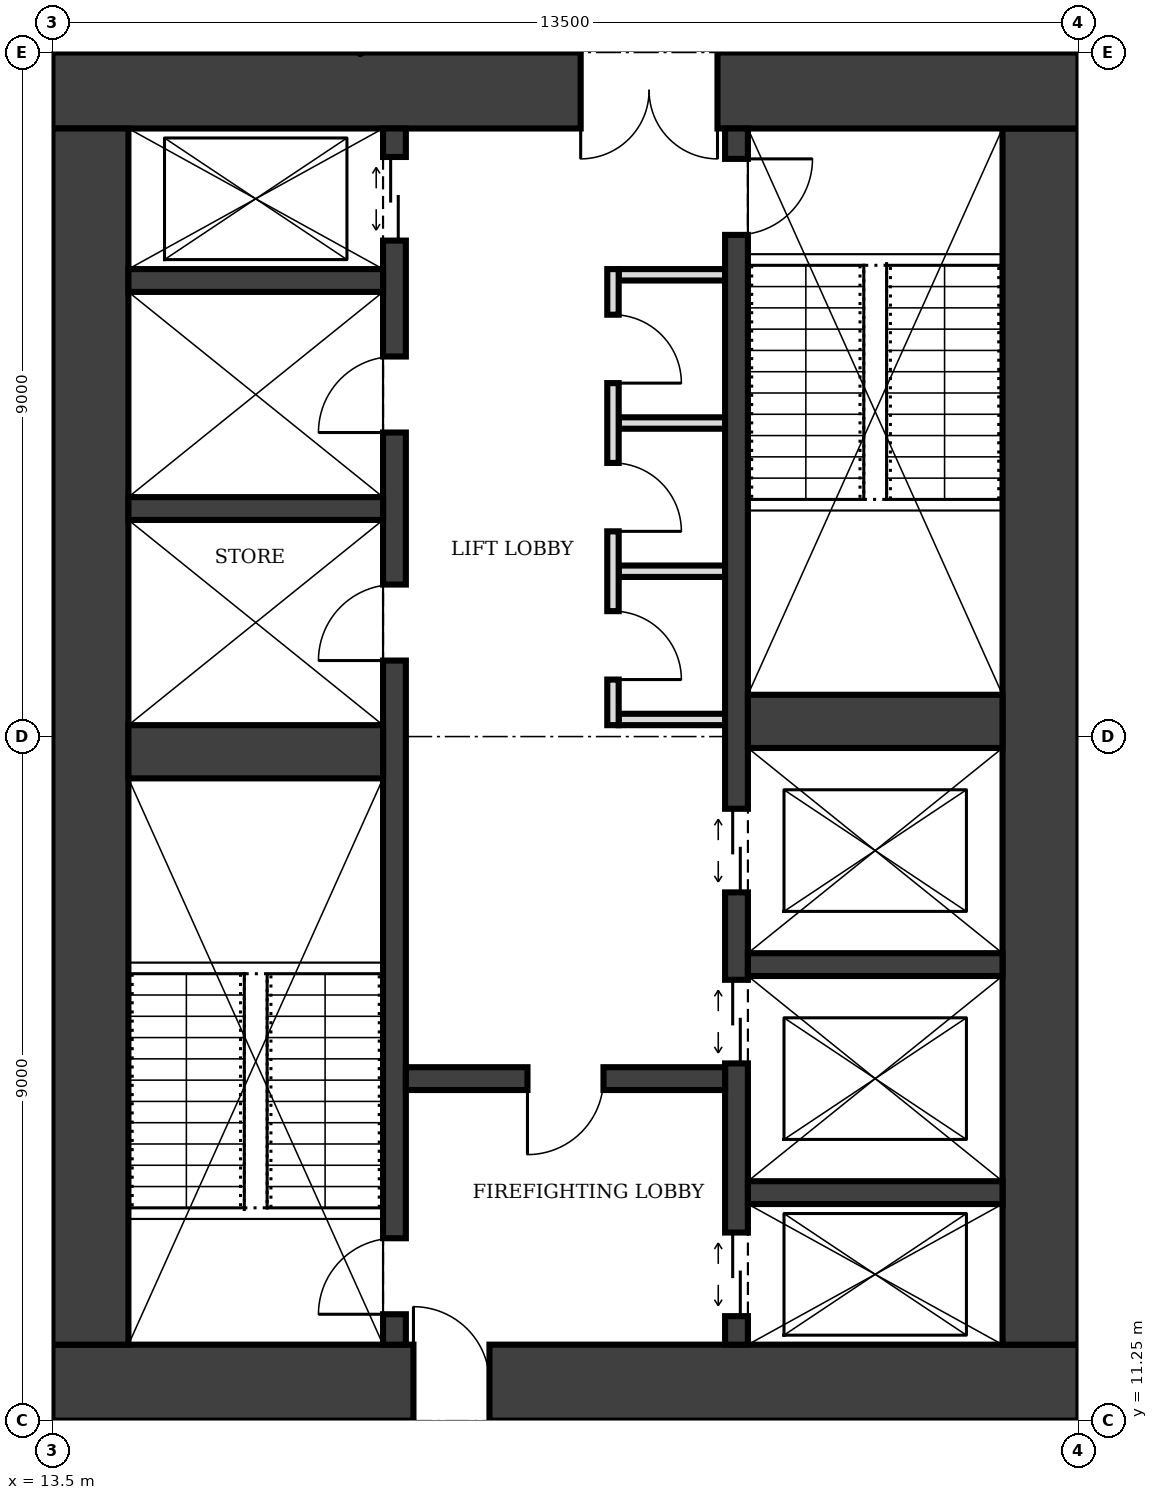
"""IFC4 building model, lengths in metres.
Left out: names, types, materials, properties, quantities, classifications, styles, units other than length and angle.
Written with IfcOpenShell. Run it as: python <this file> out.ifc"""

import sys

from ifc_helpers import new_model, si_unit, direction, frame, frame_2d, origin, place, context, subcontext, project, spatial, rectangle, extrude, element, fill, save


model = new_model("IFC4")
c1 = context("Model", 3, precision=1e-05, world=origin(), true_north=direction((0.0, 1.0)))
c2 = subcontext(c1, "Body", "Model", "MODEL_VIEW")
j1 = project(units=[si_unit("LENGTHUNIT", "METRE"), si_unit("PLANEANGLEUNIT", "RADIAN")], contexts=[c1])
p1 = place(None, origin())
s1 = spatial("IfcSite", under=j1, at=p1, CompositionType="ELEMENT")
p2 = place(p1, origin())
s2 = spatial("IfcBuilding", under=s1, at=p2, CompositionType="ELEMENT")
p3 = place(p2, frame((0.0, 0.0, 137.0)))
s3 = spatial("IfcBuildingStorey", under=s2, at=p3, CompositionType="ELEMENT", Elevation=137.0)
p4 = place(p3, frame((13.5, 11.75, 0.0), z_axis=(0.0, 0.0, 1.0), x_axis=(1.0, 0.0, 0.0)))
e1 = element("IfcWall", 1, at=p4, inside=s3, PredefinedType="SHEAR", context=c2, shape_type="SweptSolid", body=[
    extrude(rectangle(XDim=13.5, YDim=1.0, at=frame_2d((6.75, 0.0))), origin(), (0.0, 0.0, 1.0), 4.0),
])
p5 = place(p4, frame((4.75, 0.0, 0.0)))
e2 = element("IfcOpeningElement", 2, at=p5, cuts=e1, PredefinedType="OPENING", context=c2, shape_type="SweptSolid", body=[
    extrude(rectangle(XDim=1.0, YDim=2.1, at=frame_2d((0.5, 1.05))), frame((0.0, 0.51, 0.0), z_axis=(0.0, -1.0, 0.0), x_axis=(1.0, 0.0, 0.0)), (0.0, 0.0, 1.0), 1.02),
])
p6 = place(p3, frame((26.5, 12.25, 0.0), z_axis=(0.0, 0.0, 1.0), x_axis=(0.0, 1.0, 0.0)))
e3 = element("IfcWall", 3, at=p6, inside=s3, PredefinedType="SHEAR", context=c2, shape_type="SweptSolid", body=[
    extrude(rectangle(XDim=16.0, YDim=1.0, at=frame_2d((8.0, 0.0))), origin(), (0.0, 0.0, 1.0), 4.0),
])
p7 = place(p3, frame((27.0, 28.75, 0.0), z_axis=(0.0, 0.0, 1.0), x_axis=(-1.0, 0.0, 0.0)))
e4 = element("IfcWall", 4, at=p7, inside=s3, PredefinedType="SHEAR", context=c2, shape_type="SweptSolid", body=[
    extrude(rectangle(XDim=13.5, YDim=1.0, at=frame_2d((6.75, 0.0))), origin(), (0.0, 0.0, 1.0), 4.0),
])
p8 = place(p7, frame((4.75, 0.0, 0.0)))
e5 = element("IfcOpeningElement", 5, at=p8, cuts=e4, PredefinedType="OPENING", context=c2, shape_type="SweptSolid", body=[
    extrude(rectangle(XDim=1.8, YDim=2.1, at=frame_2d((0.9, 1.05))), frame((0.0, 0.51, 0.0), z_axis=(0.0, -1.0, 0.0), x_axis=(1.0, 0.0, 0.0)), (0.0, 0.0, 1.0), 1.02),
])
p9 = place(p3, frame((14.0, 28.25, 0.0), z_axis=(0.0, 0.0, 1.0), x_axis=(0.0, -1.0, 0.0)))
e6 = element("IfcWall", 6, at=p9, inside=s3, PredefinedType="SHEAR", context=c2, shape_type="SweptSolid", body=[
    extrude(rectangle(XDim=16.0, YDim=1.0, at=frame_2d((8.0, 0.0))), origin(), (0.0, 0.0, 1.0), 4.0),
])
p10 = place(p3, frame((18.0, 12.25, 0.0), z_axis=(0.0, 0.0, 1.0), x_axis=(0.0, 1.0, 0.0)))
e7 = element("IfcWall", 7, at=p10, inside=s3, PredefinedType="SHEAR", context=c2, shape_type="SweptSolid", body=[
    extrude(rectangle(XDim=16.0, YDim=0.3, at=frame_2d((8.0, 0.0))), origin(), (0.0, 0.0, 1.0), 4.0),
])
p11 = place(p10, frame((0.4, 0.0, 0.0)))
e8 = element("IfcOpeningElement", 8, at=p11, cuts=e7, PredefinedType="OPENING", context=c2, shape_type="SweptSolid", body=[
    extrude(rectangle(XDim=1.0, YDim=2.1, at=frame_2d((0.5, 1.05))), frame((0.0, 0.16, 0.0), z_axis=(0.0, -1.0, 0.0), x_axis=(1.0, 0.0, 0.0)), (0.0, 0.0, 1.0), 0.32),
])
p12 = place(p10, frame((14.525, 0.0, 0.0)))
e9 = element("IfcOpeningElement", 9, at=p12, cuts=e7, PredefinedType="OPENING", context=c2, shape_type="SweptSolid", body=[
    extrude(rectangle(XDim=1.1, YDim=2.1, at=frame_2d((0.55, 1.05))), frame((0.0, 0.16, 0.0), z_axis=(0.0, -1.0, 0.0), x_axis=(1.0, 0.0, 0.0)), (0.0, 0.0, 1.0), 0.32),
])
p13 = place(p10, frame((9.0, 0.0, 0.0)))
e10 = element("IfcOpeningElement", 10, at=p13, cuts=e7, PredefinedType="OPENING", context=c2, shape_type="SweptSolid", body=[
    extrude(rectangle(XDim=1.0, YDim=2.1, at=frame_2d((0.5, 1.05))), frame((0.0, 0.16, 0.0), z_axis=(0.0, -1.0, 0.0), x_axis=(1.0, 0.0, 0.0)), (0.0, 0.0, 1.0), 0.32),
])
p14 = place(p10, frame((12.0, 0.0, 0.0)))
e11 = element("IfcOpeningElement", 11, at=p14, cuts=e7, PredefinedType="OPENING", context=c2, shape_type="SweptSolid", body=[
    extrude(rectangle(XDim=1.0, YDim=2.1, at=frame_2d((0.5, 1.05))), frame((0.0, 0.16, 0.0), z_axis=(0.0, -1.0, 0.0), x_axis=(1.0, 0.0, 0.0)), (0.0, 0.0, 1.0), 0.32),
])
p15 = place(p3, frame((22.5, 12.25, 0.0), z_axis=(0.0, 0.0, 1.0), x_axis=(0.0, 1.0, 0.0)))
e12 = element("IfcWall", 12, at=p15, inside=s3, PredefinedType="SHEAR", context=c2, shape_type="SweptSolid", body=[
    extrude(rectangle(XDim=16.0, YDim=0.3, at=frame_2d((8.0, 0.0))), origin(), (0.0, 0.0, 1.0), 4.0),
])
p16 = place(p15, frame((14.6, 0.0, 0.0)))
e13 = element("IfcOpeningElement", 13, at=p16, cuts=e12, PredefinedType="OPENING", context=c2, shape_type="SweptSolid", body=[
    extrude(rectangle(XDim=1.0, YDim=2.1, at=frame_2d((0.5, 1.05))), frame((0.0, 0.16, 0.0), z_axis=(0.0, -1.0, 0.0), x_axis=(1.0, 0.0, 0.0)), (0.0, 0.0, 1.0), 0.32),
])
p17 = place(p15, frame((0.375, 0.0, 0.0)))
e14 = element("IfcOpeningElement", 14, at=p17, cuts=e12, PredefinedType="OPENING", context=c2, shape_type="SweptSolid", body=[
    extrude(rectangle(XDim=1.1, YDim=2.1, at=frame_2d((0.55, 1.05))), frame((0.0, 0.16, 0.0), z_axis=(0.0, -1.0, 0.0), x_axis=(1.0, 0.0, 0.0)), (0.0, 0.0, 1.0), 0.32),
])
p18 = place(p15, frame((3.7, 0.0, 0.0)))
e15 = element("IfcOpeningElement", 15, at=p18, cuts=e12, PredefinedType="OPENING", context=c2, shape_type="SweptSolid", body=[
    extrude(rectangle(XDim=1.1, YDim=2.1, at=frame_2d((0.55, 1.05))), frame((0.0, 0.16, 0.0), z_axis=(0.0, -1.0, 0.0), x_axis=(1.0, 0.0, 0.0)), (0.0, 0.0, 1.0), 0.32),
])
p19 = place(p15, frame((5.95, 0.0, 0.0)))
e16 = element("IfcOpeningElement", 16, at=p19, cuts=e12, PredefinedType="OPENING", context=c2, shape_type="SweptSolid", body=[
    extrude(rectangle(XDim=1.1, YDim=2.1, at=frame_2d((0.55, 1.05))), frame((0.0, 0.16, 0.0), z_axis=(0.0, -1.0, 0.0), x_axis=(1.0, 0.0, 0.0)), (0.0, 0.0, 1.0), 0.32),
])
p20 = place(p3, frame((14.5, 20.05, 0.0), z_axis=(0.0, 0.0, 1.0), x_axis=(1.0, 0.0, 0.0)))
e17 = element("IfcWall", 17, at=p20, inside=s3, PredefinedType="SHEAR", context=c2, shape_type="SweptSolid", body=[
    extrude(rectangle(XDim=3.35, YDim=0.7, at=frame_2d((1.675, 0.0))), origin(), (0.0, 0.0, 1.0), 4.0),
])
p21 = place(p3, frame((18.15, 15.75, 0.0), z_axis=(0.0, 0.0, 1.0), x_axis=(1.0, 0.0, 0.0)))
e18 = element("IfcWall", 18, at=p21, inside=s3, PredefinedType="SHEAR", context=c2, shape_type="SweptSolid", body=[
    extrude(rectangle(XDim=4.2, YDim=0.3, at=frame_2d((2.1, 0.0))), origin(), (0.0, 0.0, 1.0), 4.0),
])
p22 = place(p21, frame((1.6, 0.0, 0.0)))
e19 = element("IfcOpeningElement", 19, at=p22, cuts=e18, PredefinedType="OPENING", context=c2, shape_type="SweptSolid", body=[
    extrude(rectangle(XDim=1.0, YDim=2.1, at=frame_2d((0.5, 1.05))), frame((0.0, 0.16, 0.0), z_axis=(0.0, -1.0, 0.0), x_axis=(1.0, 0.0, 0.0)), (0.0, 0.0, 1.0), 0.32),
])
for number, where, z_axis, x_axis in (
    (20, (22.65, 14.25, 0.0), (0.0, 0.0, 1.0), (1.0, 0.0, 0.0)),
    (21, (22.65, 17.25, 0.0), (0.0, 0.0, 1.0), (1.0, 0.0, 0.0)),
):
    element("IfcWall", number, at=place(p3, frame(where, z_axis=z_axis, x_axis=x_axis)), inside=s3, PredefinedType="SHEAR", context=c2, shape_type="SweptSolid", body=[
        extrude(rectangle(XDim=3.35, YDim=0.3, at=frame_2d((1.675, 0.0))), origin(), (0.0, 0.0, 1.0), 4.0),
    ])
p23 = place(p3, frame((22.65, 20.45, 0.0), z_axis=(0.0, 0.0, 1.0), x_axis=(1.0, 0.0, 0.0)))
e22 = element("IfcWall", 22, at=p23, inside=s3, PredefinedType="SHEAR", context=c2, shape_type="SweptSolid", body=[
    extrude(rectangle(XDim=3.35, YDim=0.7, at=frame_2d((1.675, 0.0))), origin(), (0.0, 0.0, 1.0), 4.0),
])
for number, where, z_axis, x_axis in (
    (23, (14.5, 23.25, 0.0), (0.0, 0.0, 1.0), (1.0, 0.0, 0.0)),
    (24, (14.5, 26.25, 0.0), (0.0, 0.0, 1.0), (1.0, 0.0, 0.0)),
):
    element("IfcWall", number, at=place(p3, frame(where, z_axis=z_axis, x_axis=x_axis)), inside=s3, PredefinedType="SHEAR", context=c2, shape_type="SweptSolid", body=[
        extrude(rectangle(XDim=3.35, YDim=0.3, at=frame_2d((1.675, 0.0))), origin(), (0.0, 0.0, 1.0), 4.0),
    ])
p24 = place(p3, frame((20.875, 20.4, 0.0), z_axis=(0.0, 0.0, 1.0), x_axis=(0.0, 1.0, 0.0)))
e25 = element("IfcWall", 25, at=p24, inside=s3, PredefinedType="PARTITIONING", context=c2, shape_type="SweptSolid", body=[
    extrude(rectangle(XDim=6.0, YDim=0.15, at=frame_2d((3.0, 0.0))), origin(), (0.0, 0.0, 1.0), 3.75),
])
p25 = place(p24, frame((0.6, 0.0, 0.0)))
e26 = element("IfcOpeningElement", 26, at=p25, cuts=e25, PredefinedType="OPENING", context=c2, shape_type="SweptSolid", body=[
    extrude(rectangle(XDim=0.9, YDim=2.1, at=frame_2d((0.45, 1.05))), frame((0.0, 0.085, 0.0), z_axis=(0.0, -1.0, 0.0), x_axis=(1.0, 0.0, 0.0)), (0.0, 0.0, 1.0), 0.17),
])
p26 = place(p24, frame((2.55, 0.0, 0.0)))
e27 = element("IfcOpeningElement", 27, at=p26, cuts=e25, PredefinedType="OPENING", context=c2, shape_type="SweptSolid", body=[
    extrude(rectangle(XDim=0.9, YDim=2.1, at=frame_2d((0.45, 1.05))), frame((0.0, 0.085, 0.0), z_axis=(0.0, -1.0, 0.0), x_axis=(1.0, 0.0, 0.0)), (0.0, 0.0, 1.0), 0.17),
])
p27 = place(p24, frame((4.5, 0.0, 0.0)))
e28 = element("IfcOpeningElement", 28, at=p27, cuts=e25, PredefinedType="OPENING", context=c2, shape_type="SweptSolid", body=[
    extrude(rectangle(XDim=0.9, YDim=2.1, at=frame_2d((0.45, 1.05))), frame((0.0, 0.085, 0.0), z_axis=(0.0, -1.0, 0.0), x_axis=(1.0, 0.0, 0.0)), (0.0, 0.0, 1.0), 0.17),
])
for number, where, z_axis, x_axis in (
    (29, (20.95, 20.475, 0.0), (0.0, 0.0, 1.0), (1.0, 0.0, 0.0)),
    (30, (20.95, 22.425, 0.0), (0.0, 0.0, 1.0), (1.0, 0.0, 0.0)),
    (31, (20.95, 24.375, 0.0), (0.0, 0.0, 1.0), (1.0, 0.0, 0.0)),
    (32, (20.95, 26.325, 0.0), (0.0, 0.0, 1.0), (1.0, 0.0, 0.0)),
):
    element("IfcWall", number, at=place(p3, frame(where, z_axis=z_axis, x_axis=x_axis)), inside=s3, PredefinedType="PARTITIONING", context=c2, shape_type="SweptSolid", body=[
        extrude(rectangle(XDim=1.4, YDim=0.15, at=frame_2d((0.7, 0.0))), origin(), (0.0, 0.0, 1.0), 3.75),
    ])
p28 = place(p5, origin())
e33 = element("IfcDoor", 33, at=p28, inside=s3, OperationType="SINGLE_SWING_LEFT", PredefinedType="DOOR", context=c2, shape_type="SweptSolid", body=[
    extrude(rectangle(XDim=1.0, YDim=2.1, at=frame_2d((0.5, 1.05))), frame((0.0, 0.025, 0.0), z_axis=(0.0, -1.0, 0.0), x_axis=(1.0, 0.0, 0.0)), (0.0, 0.0, 1.0), 0.05),
])
fill(e2, e33)
p29 = place(p8, origin())
e34 = element("IfcDoor", 34, at=p29, inside=s3, OperationType="DOUBLE_DOOR_SINGLE_SWING", PredefinedType="DOOR", context=c2, shape_type="SweptSolid", body=[
    extrude(rectangle(XDim=1.8, YDim=2.1, at=frame_2d((0.9, 1.05))), frame((0.0, 0.025, 0.0), z_axis=(0.0, -1.0, 0.0), x_axis=(1.0, 0.0, 0.0)), (0.0, 0.0, 1.0), 0.05),
])
fill(e5, e34)
p30 = place(p22, frame((1.0, 0.0, 0.0), z_axis=(0.0, 0.0, 1.0), x_axis=(-1.0, 0.0, 0.0)))
e35 = element("IfcDoor", 35, at=p30, inside=s3, OperationType="SINGLE_SWING_RIGHT", PredefinedType="DOOR", context=c2, shape_type="SweptSolid", body=[
    extrude(rectangle(XDim=1.0, YDim=2.1, at=frame_2d((0.5, 1.05))), frame((0.0, 0.025, 0.0), z_axis=(0.0, -1.0, 0.0), x_axis=(1.0, 0.0, 0.0)), (0.0, 0.0, 1.0), 0.05),
])
fill(e19, e35)
p31 = place(p11, origin())
e36 = element("IfcDoor", 36, at=p31, inside=s3, OperationType="SINGLE_SWING_LEFT", PredefinedType="DOOR", context=c2, shape_type="SweptSolid", body=[
    extrude(rectangle(XDim=1.0, YDim=2.1, at=frame_2d((0.5, 1.05))), frame((0.0, 0.025, 0.0), z_axis=(0.0, -1.0, 0.0), x_axis=(1.0, 0.0, 0.0)), (0.0, 0.0, 1.0), 0.05),
])
fill(e8, e36)
p32 = place(p16, frame((1.0, 0.0, 0.0), z_axis=(0.0, 0.0, 1.0), x_axis=(-1.0, 0.0, 0.0)))
e37 = element("IfcDoor", 37, at=p32, inside=s3, OperationType="SINGLE_SWING_LEFT", PredefinedType="DOOR", context=c2, shape_type="SweptSolid", body=[
    extrude(rectangle(XDim=1.0, YDim=2.1, at=frame_2d((0.5, 1.05))), frame((0.0, 0.025, 0.0), z_axis=(0.0, -1.0, 0.0), x_axis=(1.0, 0.0, 0.0)), (0.0, 0.0, 1.0), 0.05),
])
fill(e13, e37)
p33 = place(p17, origin())
e38 = element("IfcDoor", 38, at=p33, inside=s3, OperationType="DOUBLE_DOOR_SLIDING", PredefinedType="DOOR", context=c2, shape_type="SweptSolid", body=[
    extrude(rectangle(XDim=1.1, YDim=2.1, at=frame_2d((0.55, 1.05))), frame((0.0, 0.025, 0.0), z_axis=(0.0, -1.0, 0.0), x_axis=(1.0, 0.0, 0.0)), (0.0, 0.0, 1.0), 0.05),
])
fill(e14, e38)
p34 = place(p12, origin())
e39 = element("IfcDoor", 39, at=p34, inside=s3, OperationType="DOUBLE_DOOR_SLIDING", PredefinedType="DOOR", context=c2, shape_type="SweptSolid", body=[
    extrude(rectangle(XDim=1.1, YDim=2.1, at=frame_2d((0.55, 1.05))), frame((0.0, 0.025, 0.0), z_axis=(0.0, -1.0, 0.0), x_axis=(1.0, 0.0, 0.0)), (0.0, 0.0, 1.0), 0.05),
])
fill(e9, e39)
p35 = place(p18, origin())
e40 = element("IfcDoor", 40, at=p35, inside=s3, OperationType="DOUBLE_DOOR_SLIDING", PredefinedType="DOOR", context=c2, shape_type="SweptSolid", body=[
    extrude(rectangle(XDim=1.1, YDim=2.1, at=frame_2d((0.55, 1.05))), frame((0.0, 0.025, 0.0), z_axis=(0.0, -1.0, 0.0), x_axis=(1.0, 0.0, 0.0)), (0.0, 0.0, 1.0), 0.05),
])
fill(e15, e40)
p36 = place(p19, origin())
e41 = element("IfcDoor", 41, at=p36, inside=s3, OperationType="DOUBLE_DOOR_SLIDING", PredefinedType="DOOR", context=c2, shape_type="SweptSolid", body=[
    extrude(rectangle(XDim=1.1, YDim=2.1, at=frame_2d((0.55, 1.05))), frame((0.0, 0.025, 0.0), z_axis=(0.0, -1.0, 0.0), x_axis=(1.0, 0.0, 0.0)), (0.0, 0.0, 1.0), 0.05),
])
fill(e16, e41)
p37 = place(p25, frame((0.9, 0.0, 0.0), z_axis=(0.0, 0.0, 1.0), x_axis=(-1.0, 0.0, 0.0)))
e42 = element("IfcDoor", 42, at=p37, inside=s3, OperationType="SINGLE_SWING_RIGHT", PredefinedType="DOOR", context=c2, shape_type="SweptSolid", body=[
    extrude(rectangle(XDim=0.9, YDim=2.1, at=frame_2d((0.45, 1.05))), frame((0.0, 0.025, 0.0), z_axis=(0.0, -1.0, 0.0), x_axis=(1.0, 0.0, 0.0)), (0.0, 0.0, 1.0), 0.05),
])
fill(e26, e42)
p38 = place(p26, frame((0.9, 0.0, 0.0), z_axis=(0.0, 0.0, 1.0), x_axis=(-1.0, 0.0, 0.0)))
e43 = element("IfcDoor", 43, at=p38, inside=s3, OperationType="SINGLE_SWING_RIGHT", PredefinedType="DOOR", context=c2, shape_type="SweptSolid", body=[
    extrude(rectangle(XDim=0.9, YDim=2.1, at=frame_2d((0.45, 1.05))), frame((0.0, 0.025, 0.0), z_axis=(0.0, -1.0, 0.0), x_axis=(1.0, 0.0, 0.0)), (0.0, 0.0, 1.0), 0.05),
])
fill(e27, e43)
p39 = place(p27, frame((0.9, 0.0, 0.0), z_axis=(0.0, 0.0, 1.0), x_axis=(-1.0, 0.0, 0.0)))
e44 = element("IfcDoor", 44, at=p39, inside=s3, OperationType="SINGLE_SWING_RIGHT", PredefinedType="DOOR", context=c2, shape_type="SweptSolid", body=[
    extrude(rectangle(XDim=0.9, YDim=2.1, at=frame_2d((0.45, 1.05))), frame((0.0, 0.025, 0.0), z_axis=(0.0, -1.0, 0.0), x_axis=(1.0, 0.0, 0.0)), (0.0, 0.0, 1.0), 0.05),
])
fill(e28, e44)
p40 = place(p13, origin())
e45 = element("IfcDoor", 45, at=p40, inside=s3, OperationType="SINGLE_SWING_LEFT", PredefinedType="DOOR", context=c2, shape_type="SweptSolid", body=[
    extrude(rectangle(XDim=1.0, YDim=2.1, at=frame_2d((0.5, 1.05))), frame((0.0, 0.025, 0.0), z_axis=(0.0, -1.0, 0.0), x_axis=(1.0, 0.0, 0.0)), (0.0, 0.0, 1.0), 0.05),
])
fill(e10, e45)
p41 = place(p14, origin())
e46 = element("IfcDoor", 46, at=p41, inside=s3, OperationType="SINGLE_SWING_LEFT", PredefinedType="DOOR", context=c2, shape_type="SweptSolid", body=[
    extrude(rectangle(XDim=1.0, YDim=2.1, at=frame_2d((0.5, 1.05))), frame((0.0, 0.025, 0.0), z_axis=(0.0, -1.0, 0.0), x_axis=(1.0, 0.0, 0.0)), (0.0, 0.0, 1.0), 0.05),
])
fill(e11, e46)
save(model, sys.argv[1])
